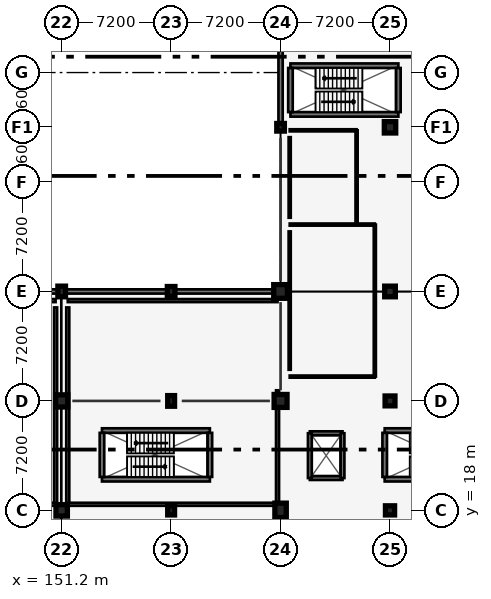
"""IFC4 building model, lengths in metres.
Left out: names, types, materials, properties, quantities, classifications, styles, units other than length and angle.
Written with IfcOpenShell. Run it as: python <this file> out.ifc"""

import sys

from ifc_helpers import new_model, si_unit, direction, frame, frame_2d, origin, origin_2d, place, context, subcontext, project, spatial, rectangle, circle, extrude, element, fill, save


model = new_model("IFC4")
c1 = context("Model", 3, precision=1e-05, world=origin(), true_north=direction((0.0, 1.0)))
c2 = subcontext(c1, "Body", "Model", "MODEL_VIEW")
j1 = project(units=[si_unit("LENGTHUNIT", "METRE"), si_unit("PLANEANGLEUNIT", "RADIAN")], contexts=[c1])
p1 = place(None, origin())
s1 = spatial("IfcSite", under=j1, at=p1, CompositionType="ELEMENT")
p2 = place(p1, origin())
s2 = spatial("IfcBuilding", under=s1, at=p2, CompositionType="ELEMENT")
p3 = place(p2, frame((0.0, 0.0, 9.0)))
s3 = spatial("IfcBuildingStorey", under=s2, at=p3, CompositionType="ELEMENT", Elevation=9.0)
p4 = place(p3, frame((151.2, 18.0, 0.0), z_axis=(0.0, 0.0, 1.0), x_axis=(1.0, 0.0, 0.0)))
e1 = element("IfcColumn", 1, at=p4, inside=s3, PredefinedType="COLUMN", context=c2, shape_type="SweptSolid", body=[
    extrude(rectangle(XDim=0.75, YDim=0.75, at=origin_2d()), origin(), (0.0, 0.0, 1.0), 4.2),
])
p5 = place(p3, frame((151.2, 25.2, 0.0), z_axis=(0.0, 0.0, 1.0), x_axis=(1.0, 0.0, 0.0)))
e2 = element("IfcColumn", 2, at=p5, inside=s3, PredefinedType="COLUMN", context=c2, shape_type="SweptSolid", body=[
    extrude(rectangle(XDim=0.8, YDim=0.8, at=origin_2d()), origin(), (0.0, 0.0, 1.0), 4.2),
])
p6 = place(p3, frame((151.2, 32.4, 0.0), z_axis=(0.0, 0.0, 1.0), x_axis=(1.0, 0.0, 0.0)))
e3 = element("IfcColumn", 3, at=p6, inside=s3, PredefinedType="COLUMN", context=c2, shape_type="SweptSolid", body=[
    extrude(rectangle(XDim=0.5, YDim=0.7, at=origin_2d()), origin(), (0.0, 0.0, 1.0), 4.2),
])
p7 = place(p3, frame((158.4, 18.0, 0.0), z_axis=(0.0, 0.0, 1.0), x_axis=(1.0, 0.0, 0.0)))
e4 = element("IfcColumn", 4, at=p7, inside=s3, PredefinedType="COLUMN", context=c2, shape_type="SweptSolid", body=[
    extrude(rectangle(XDim=0.45, YDim=0.6, at=origin_2d()), origin(), (0.0, 0.0, 1.0), 4.2),
])
p8 = place(p3, frame((158.4, 25.2, 0.0), z_axis=(0.0, 0.0, 1.0), x_axis=(1.0, 0.0, 0.0)))
e5 = element("IfcColumn", 5, at=p8, inside=s3, PredefinedType="COLUMN", context=c2, shape_type="SweptSolid", body=[
    extrude(rectangle(XDim=0.45, YDim=0.7, at=origin_2d()), origin(), (0.0, 0.0, 1.0), 4.2),
])
p9 = place(p3, frame((158.4, 32.4, 0.0), z_axis=(0.0, 0.0, 1.0), x_axis=(1.0, 0.0, 0.0)))
e6 = element("IfcColumn", 6, at=p9, inside=s3, PredefinedType="COLUMN", context=c2, shape_type="SweptSolid", body=[
    extrude(rectangle(XDim=0.5, YDim=0.65, at=origin_2d()), origin(), (0.0, 0.0, 1.0), 4.2),
])
p10 = place(p3, frame((165.6, 18.0, 0.0), z_axis=(0.0, 0.0, 1.0), x_axis=(1.0, 0.0, 0.0)))
e7 = element("IfcColumn", 7, at=p10, inside=s3, PredefinedType="COLUMN", context=c2, shape_type="SweptSolid", body=[
    extrude(rectangle(XDim=0.75, YDim=0.95, at=origin_2d()), origin(), (0.0, 0.0, 1.0), 4.2),
])
p11 = place(p3, frame((165.6, 25.2, 0.0), z_axis=(0.0, 0.0, 1.0), x_axis=(1.0, 0.0, 0.0)))
e8 = element("IfcColumn", 8, at=p11, inside=s3, PredefinedType="COLUMN", context=c2, shape_type="SweptSolid", body=[
    extrude(rectangle(XDim=0.85, YDim=0.85, at=origin_2d()), origin(), (0.0, 0.0, 1.0), 4.2),
])
p12 = place(p3, frame((165.6, 32.4, 0.0), z_axis=(0.0, 0.0, 1.0), x_axis=(1.0, 0.0, 0.0)))
e9 = element("IfcColumn", 9, at=p12, inside=s3, PredefinedType="COLUMN", context=c2, shape_type="SweptSolid", body=[
    extrude(rectangle(XDim=0.9, YDim=0.9, at=origin_2d()), origin(), (0.0, 0.0, 1.0), 4.2),
])
p13 = place(p3, frame((165.6, 43.2, 0.0), z_axis=(0.0, 0.0, 1.0), x_axis=(1.0, 0.0, 0.0)))
e10 = element("IfcColumn", 10, at=p13, inside=s3, PredefinedType="COLUMN", context=c2, shape_type="SweptSolid", body=[
    extrude(circle(Radius=0.25, at=origin_2d()), origin(), (0.0, 0.0, 1.0), 4.2),
])
p14 = place(p3, frame((172.8, 18.0, 0.0), z_axis=(0.0, 0.0, 1.0), x_axis=(1.0, 0.0, 0.0)))
e11 = element("IfcColumn", 11, at=p14, inside=s3, PredefinedType="COLUMN", context=c2, shape_type="SweptSolid", body=[
    extrude(rectangle(XDim=0.6, YDim=0.6, at=origin_2d()), origin(), (0.0, 0.0, 1.0), 4.2),
])
p15 = place(p3, frame((172.8, 25.2, 0.0), z_axis=(0.0, 0.0, 1.0), x_axis=(1.0, 0.0, 0.0)))
e12 = element("IfcColumn", 12, at=p15, inside=s3, PredefinedType="COLUMN", context=c2, shape_type="SweptSolid", body=[
    extrude(rectangle(XDim=0.65, YDim=0.65, at=origin_2d()), origin(), (0.0, 0.0, 1.0), 4.2),
])
p16 = place(p3, frame((172.8, 32.4, 0.0), z_axis=(0.0, 0.0, 1.0), x_axis=(1.0, 0.0, 0.0)))
e13 = element("IfcColumn", 13, at=p16, inside=s3, PredefinedType="COLUMN", context=c2, shape_type="SweptSolid", body=[
    extrude(rectangle(XDim=0.7, YDim=0.7, at=origin_2d()), origin(), (0.0, 0.0, 1.0), 4.2),
])
p17 = place(p3, frame((172.8, 43.2, 0.0), z_axis=(0.0, 0.0, 1.0), x_axis=(1.0, 0.0, 0.0)))
e14 = element("IfcColumn", 14, at=p17, inside=s3, PredefinedType="COLUMN", context=c2, shape_type="SweptSolid", body=[
    extrude(rectangle(XDim=0.75, YDim=0.75, at=origin_2d()), origin(), (0.0, 0.0, 1.0), 4.2),
])
p18 = place(p3, frame((165.6, 86.4, 0.0), z_axis=(0.0, 0.0, 1.0), x_axis=(0.0, -1.0, 0.0)))
e15 = element("IfcWall", 15, at=p18, inside=s3, PredefinedType="SOLIDWALL", context=c2, shape_type="SweptSolid", body=[
    extrude(rectangle(XDim=43.2, YDim=0.28, at=frame_2d((21.6, 0.0))), origin(), (0.0, 0.0, 1.0), 3.4),
])
p19 = place(p18, frame((9.4, 0.0, 0.78)))
e16 = element("IfcOpeningElement", 16, at=p19, cuts=e15, PredefinedType="OPENING", context=c2, shape_type="SweptSolid", body=[
    extrude(rectangle(XDim=2.1, YDim=1.8, at=frame_2d((1.05, 0.9))), frame((0.0, 0.15, 0.0), z_axis=(0.0, -1.0, 0.0), x_axis=(1.0, 0.0, 0.0)), (0.0, 0.0, 1.0), 0.3),
])
p20 = place(p18, frame((16.6, 0.0, 0.78)))
e17 = element("IfcOpeningElement", 17, at=p20, cuts=e15, PredefinedType="OPENING", context=c2, shape_type="SweptSolid", body=[
    extrude(rectangle(XDim=1.1, YDim=1.65, at=frame_2d((0.55, 0.825))), frame((0.0, 0.15, 0.0), z_axis=(0.0, -1.0, 0.0), x_axis=(1.0, 0.0, 0.0)), (0.0, 0.0, 1.0), 0.3),
])
p21 = place(p18, frame((23.8, 0.0, 0.78)))
e18 = element("IfcOpeningElement", 18, at=p21, cuts=e15, PredefinedType="OPENING", context=c2, shape_type="SweptSolid", body=[
    extrude(rectangle(XDim=1.25, YDim=1.7, at=frame_2d((0.625, 0.85))), frame((0.0, 0.15, 0.0), z_axis=(0.0, -1.0, 0.0), x_axis=(1.0, 0.0, 0.0)), (0.0, 0.0, 1.0), 0.3),
])
p22 = place(p3, frame((165.6, 32.4, 0.0), z_axis=(0.0, 0.0, 1.0), x_axis=(-1.0, 0.0, 0.0)))
e19 = element("IfcWall", 19, at=p22, inside=s3, PredefinedType="SOLIDWALL", context=c2, shape_type="SweptSolid", body=[
    extrude(rectangle(XDim=43.2, YDim=0.28, at=frame_2d((21.6, 0.0))), origin(), (0.0, 0.0, 1.0), 3.4),
])
p23 = place(p22, frame((2.2, 0.0, 0.78)))
e20 = element("IfcOpeningElement", 20, at=p23, cuts=e19, PredefinedType="OPENING", context=c2, shape_type="SweptSolid", body=[
    extrude(rectangle(XDim=2.1, YDim=1.8, at=frame_2d((1.05, 0.9))), frame((0.0, 0.15, 0.0), z_axis=(0.0, -1.0, 0.0), x_axis=(1.0, 0.0, 0.0)), (0.0, 0.0, 1.0), 0.3),
])
p24 = place(p22, frame((9.4, 0.0, 0.78)))
e21 = element("IfcOpeningElement", 21, at=p24, cuts=e19, PredefinedType="OPENING", context=c2, shape_type="SweptSolid", body=[
    extrude(rectangle(XDim=1.1, YDim=1.65, at=frame_2d((0.55, 0.825))), frame((0.0, 0.15, 0.0), z_axis=(0.0, -1.0, 0.0), x_axis=(1.0, 0.0, 0.0)), (0.0, 0.0, 1.0), 0.3),
])
p25 = place(p22, frame((16.6, 0.0, 0.78)))
e22 = element("IfcOpeningElement", 22, at=p25, cuts=e19, PredefinedType="OPENING", context=c2, shape_type="SweptSolid", body=[
    extrude(rectangle(XDim=1.25, YDim=1.7, at=frame_2d((0.625, 0.85))), frame((0.0, 0.15, 0.0), z_axis=(0.0, -1.0, 0.0), x_axis=(1.0, 0.0, 0.0)), (0.0, 0.0, 1.0), 0.3),
])
p26 = place(p22, frame((23.8, 0.0, 0.78)))
e23 = element("IfcOpeningElement", 23, at=p26, cuts=e19, PredefinedType="OPENING", context=c2, shape_type="SweptSolid", body=[
    extrude(rectangle(XDim=1.35, YDim=1.75, at=frame_2d((0.675, 0.875))), frame((0.0, 0.15, 0.0), z_axis=(0.0, -1.0, 0.0), x_axis=(1.0, 0.0, 0.0)), (0.0, 0.0, 1.0), 0.3),
])
p27 = place(p22, frame((31.0, 0.0, 0.78)))
e24 = element("IfcOpeningElement", 24, at=p27, cuts=e19, PredefinedType="OPENING", context=c2, shape_type="SweptSolid", body=[
    extrude(rectangle(XDim=1.5, YDim=1.75, at=frame_2d((0.75, 0.875))), frame((0.0, 0.15, 0.0), z_axis=(0.0, -1.0, 0.0), x_axis=(1.0, 0.0, 0.0)), (0.0, 0.0, 1.0), 0.3),
])
p28 = place(p3, frame((153.85, 20.05, 0.0), z_axis=(0.0, 0.0, 1.0), x_axis=(1.0, 0.0, 0.0)))
e25 = element("IfcWall", 25, at=p28, inside=s3, PredefinedType="SHEAR", context=c2, shape_type="SweptSolid", body=[
    extrude(rectangle(XDim=7.1, YDim=0.3, at=frame_2d((3.55, 0.0))), origin(), (0.0, 0.0, 1.0), 3.875),
])
p29 = place(p28, frame((0.35, 0.0, 0.0)))
e26 = element("IfcOpeningElement", 26, at=p29, cuts=e25, PredefinedType="OPENING", context=c2, shape_type="SweptSolid", body=[
    extrude(rectangle(XDim=1.05, YDim=2.15, at=frame_2d((0.525, 1.075))), frame((0.0, 0.16, 0.0), z_axis=(0.0, -1.0, 0.0), x_axis=(1.0, 0.0, 0.0)), (0.0, 0.0, 1.0), 0.32),
])
p30 = place(p3, frame((160.95, 23.25, 0.0), z_axis=(0.0, 0.0, 1.0), x_axis=(-1.0, 0.0, 0.0)))
e27 = element("IfcWall", 27, at=p30, inside=s3, PredefinedType="SHEAR", context=c2, shape_type="SweptSolid", body=[
    extrude(rectangle(XDim=7.1, YDim=0.3, at=frame_2d((3.55, 0.0))), origin(), (0.0, 0.0, 1.0), 3.875),
])
for number, where, z_axis, x_axis in (
    (28, (160.95, 20.2, 0.0), (0.0, 0.0, 1.0), (0.0, 1.0, 0.0)),
    (29, (153.85, 23.1, 0.0), (0.0, 0.0, 1.0), (0.0, -1.0, 0.0)),
):
    element("IfcWall", number, at=place(p3, frame(where, z_axis=z_axis, x_axis=x_axis)), inside=s3, PredefinedType="SHEAR", context=c2, shape_type="SweptSolid", body=[
        extrude(rectangle(XDim=2.9, YDim=0.3, at=frame_2d((1.45, 0.0))), origin(), (0.0, 0.0, 1.0), 3.875),
    ])
p31 = place(p3, frame((172.45, 20.05, 0.0), z_axis=(0.0, 0.0, 1.0), x_axis=(1.0, 0.0, 0.0)))
e30 = element("IfcWall", 30, at=p31, inside=s3, PredefinedType="SHEAR", context=c2, shape_type="SweptSolid", body=[
    extrude(rectangle(XDim=7.1, YDim=0.3, at=frame_2d((3.55, 0.0))), origin(), (0.0, 0.0, 1.0), 3.875),
])
p32 = place(p31, frame((0.35, 0.0, 0.0)))
e31 = element("IfcOpeningElement", 31, at=p32, cuts=e30, PredefinedType="OPENING", context=c2, shape_type="SweptSolid", body=[
    extrude(rectangle(XDim=1.05, YDim=2.15, at=frame_2d((0.525, 1.075))), frame((0.0, 0.16, 0.0), z_axis=(0.0, -1.0, 0.0), x_axis=(1.0, 0.0, 0.0)), (0.0, 0.0, 1.0), 0.32),
])
p33 = place(p3, frame((179.55, 23.25, 0.0), z_axis=(0.0, 0.0, 1.0), x_axis=(-1.0, 0.0, 0.0)))
e32 = element("IfcWall", 32, at=p33, inside=s3, PredefinedType="SHEAR", context=c2, shape_type="SweptSolid", body=[
    extrude(rectangle(XDim=7.1, YDim=0.3, at=frame_2d((3.55, 0.0))), origin(), (0.0, 0.0, 1.0), 3.875),
])
p34 = place(p3, frame((172.45, 23.1, 0.0), z_axis=(0.0, 0.0, 1.0), x_axis=(0.0, -1.0, 0.0)))
e33 = element("IfcWall", 33, at=p34, inside=s3, PredefinedType="SHEAR", context=c2, shape_type="SweptSolid", body=[
    extrude(rectangle(XDim=2.9, YDim=0.3, at=frame_2d((1.45, 0.0))), origin(), (0.0, 0.0, 1.0), 3.875),
])
for number, where, z_axis, x_axis in (
    (34, (166.25, 44.05, 0.0), (0.0, 0.0, 1.0), (1.0, 0.0, 0.0)),
    (35, (173.35, 47.25, 0.0), (0.0, 0.0, 1.0), (-1.0, 0.0, 0.0)),
):
    element("IfcWall", number, at=place(p3, frame(where, z_axis=z_axis, x_axis=x_axis)), inside=s3, PredefinedType="SHEAR", context=c2, shape_type="SweptSolid", body=[
        extrude(rectangle(XDim=7.1, YDim=0.3, at=frame_2d((3.55, 0.0))), origin(), (0.0, 0.0, 1.0), 3.925),
    ])
p35 = place(p3, frame((173.35, 44.2, 0.0), z_axis=(0.0, 0.0, 1.0), x_axis=(0.0, 1.0, 0.0)))
e36 = element("IfcWall", 36, at=p35, inside=s3, PredefinedType="SHEAR", context=c2, shape_type="SweptSolid", body=[
    extrude(rectangle(XDim=2.9, YDim=0.3, at=frame_2d((1.45, 0.0))), origin(), (0.0, 0.0, 1.0), 3.925),
])
p36 = place(p3, frame((166.25, 47.1, 0.0), z_axis=(0.0, 0.0, 1.0), x_axis=(0.0, -1.0, 0.0)))
e37 = element("IfcWall", 37, at=p36, inside=s3, PredefinedType="SHEAR", context=c2, shape_type="SweptSolid", body=[
    extrude(rectangle(XDim=2.9, YDim=0.3, at=frame_2d((1.45, 0.0))), origin(), (0.0, 0.0, 1.0), 3.925),
])
p37 = place(p36, frame((0.75, 0.0, 0.0)))
e38 = element("IfcOpeningElement", 38, at=p37, cuts=e37, PredefinedType="OPENING", context=c2, shape_type="SweptSolid", body=[
    extrude(rectangle(XDim=1.05, YDim=2.15, at=frame_2d((0.525, 1.075))), frame((0.0, 0.16, 0.0), z_axis=(0.0, -1.0, 0.0), x_axis=(1.0, 0.0, 0.0)), (0.0, 0.0, 1.0), 0.32),
])
p38 = place(p3, frame((167.525, 20.125, 0.0), z_axis=(0.0, 0.0, 1.0), x_axis=(1.0, 0.0, 0.0)))
e39 = element("IfcWall", 39, at=p38, inside=s3, PredefinedType="SHEAR", context=c2, shape_type="SweptSolid", body=[
    extrude(rectangle(XDim=2.15, YDim=0.25, at=frame_2d((1.075, 0.0))), origin(), (0.0, 0.0, 1.0), 3.9),
])
p39 = place(p3, frame((169.675, 23.075, 0.0), z_axis=(0.0, 0.0, 1.0), x_axis=(-1.0, 0.0, 0.0)))
e40 = element("IfcWall", 40, at=p39, inside=s3, PredefinedType="SHEAR", context=c2, shape_type="SweptSolid", body=[
    extrude(rectangle(XDim=2.15, YDim=0.25, at=frame_2d((1.075, 0.0))), origin(), (0.0, 0.0, 1.0), 3.9),
])
p40 = place(p39, frame((0.525, 0.0, 0.0)))
e41 = element("IfcOpeningElement", 41, at=p40, cuts=e40, PredefinedType="OPENING", context=c2, shape_type="SweptSolid", body=[
    extrude(rectangle(XDim=1.1, YDim=2.15, at=frame_2d((0.55, 1.075))), frame((0.0, 0.135, 0.0), z_axis=(0.0, -1.0, 0.0), x_axis=(1.0, 0.0, 0.0)), (0.0, 0.0, 1.0), 0.27),
])
for number, where, z_axis, x_axis in (
    (42, (167.525, 23.075, 0.0), (0.0, 0.0, 1.0), (0.0, -1.0, 0.0)),
    (43, (169.675, 20.125, 0.0), (0.0, 0.0, 1.0), (0.0, 1.0, 0.0)),
):
    element("IfcWall", number, at=place(p3, frame(where, z_axis=z_axis, x_axis=x_axis)), inside=s3, PredefinedType="SHEAR", context=c2, shape_type="SweptSolid", body=[
        extrude(rectangle(XDim=2.95, YDim=0.25, at=frame_2d((1.475, 0.0))), origin(), (0.0, 0.0, 1.0), 3.9),
    ])
p41 = place(p3, frame((130.0, 31.8, 0.0), z_axis=(0.0, 0.0, 1.0), x_axis=(1.0, 0.0, 0.0)))
e44 = element("IfcWall", 44, at=p41, inside=s3, PredefinedType="SOLIDWALL", context=c2, shape_type="SweptSolid", body=[
    extrude(rectangle(XDim=20.8, YDim=0.2, at=frame_2d((10.4, 0.0))), origin(), (0.0, 0.0, 1.0), 3.502),
])
p42 = place(p3, frame((150.8, 18.4, 0.0), z_axis=(0.0, 0.0, 1.0), x_axis=(0.0, 1.0, 0.0)))
e45 = element("IfcWall", 45, at=p42, inside=s3, PredefinedType="SOLIDWALL", context=c2, shape_type="SweptSolid", body=[
    extrude(rectangle(XDim=12.95, YDim=0.2, at=frame_2d((6.475, 0.0))), origin(), (0.0, 0.0, 1.0), 3.207),
])
p43 = place(p3, frame((150.8, 18.4, 0.0), z_axis=(0.0, 0.0, 1.0), x_axis=(-1.0, 0.0, 0.0)))
e46 = element("IfcWall", 46, at=p43, inside=s3, PredefinedType="SOLIDWALL", context=c2, shape_type="SweptSolid", body=[
    extrude(rectangle(XDim=20.8, YDim=0.2, at=frame_2d((10.4, 0.0))), origin(), (0.0, 0.0, 1.0), 3.107),
])
p44 = place(p43, frame((9.5, 0.0, 0.0)))
e47 = element("IfcOpeningElement", 47, at=p44, cuts=e46, PredefinedType="OPENING", context=c2, shape_type="SweptSolid", body=[
    extrude(rectangle(XDim=1.8, YDim=2.2, at=frame_2d((0.9, 1.1))), frame((0.0, 0.11, 0.0), z_axis=(0.0, -1.0, 0.0), x_axis=(1.0, 0.0, 0.0)), (0.0, 0.0, 1.0), 0.22),
])
p45 = place(p3, frame((151.6, 31.8, 0.0), z_axis=(0.0, 0.0, 1.0), x_axis=(1.0, 0.0, 0.0)))
e48 = element("IfcWall", 48, at=p45, inside=s3, PredefinedType="SOLIDWALL", context=c2, shape_type="SweptSolid", body=[
    extrude(rectangle(XDim=13.8, YDim=0.2, at=frame_2d((6.9, 0.0))), origin(), (0.0, 0.0, 1.0), 3.007),
])
p46 = place(p3, frame((165.4, 18.4, 0.0), z_axis=(0.0, 0.0, 1.0), x_axis=(0.0, 1.0, 0.0)))
e49 = element("IfcWall", 49, at=p46, inside=s3, PredefinedType="SOLIDWALL", context=c2, shape_type="SweptSolid", body=[
    extrude(rectangle(XDim=7.5, YDim=0.2, at=frame_2d((3.75, 0.0))), origin(), (0.0, 0.0, 1.0), 3.502),
])
p47 = place(p3, frame((151.6, 31.35, 0.0), z_axis=(0.0, 0.0, 1.0), x_axis=(0.0, -1.0, 0.0)))
e50 = element("IfcWall", 50, at=p47, inside=s3, PredefinedType="SOLIDWALL", context=c2, shape_type="SweptSolid", body=[
    extrude(rectangle(XDim=12.95, YDim=0.2, at=frame_2d((6.475, 0.0))), origin(), (0.0, 0.0, 1.0), 3.257),
])
p48 = place(p3, frame((165.4, 18.4, 0.0), z_axis=(0.0, 0.0, 1.0), x_axis=(-1.0, 0.0, 0.0)))
e51 = element("IfcWall", 51, at=p48, inside=s3, PredefinedType="SOLIDWALL", context=c2, shape_type="SweptSolid", body=[
    extrude(rectangle(XDim=13.8, YDim=0.2, at=frame_2d((6.9, 0.0))), origin(), (0.0, 0.0, 1.0), 3.057),
])
p49 = place(p48, frame((3.6, 0.0, 0.0)))
e52 = element("IfcOpeningElement", 52, at=p49, cuts=e51, PredefinedType="OPENING", context=c2, shape_type="SweptSolid", body=[
    extrude(rectangle(XDim=1.8, YDim=2.2, at=frame_2d((0.9, 1.1))), frame((0.0, 0.11, 0.0), z_axis=(0.0, -1.0, 0.0), x_axis=(1.0, 0.0, 0.0)), (0.0, 0.0, 1.0), 0.22),
])
for number, where, z_axis, x_axis in (
    (53, (166.2, 36.8, 0.0), (0.0, 0.0, 1.0), (1.0, 0.0, 0.0)),
    (54, (171.8, 26.8, 0.0), (0.0, 0.0, 1.0), (-1.0, 0.0, 0.0)),
):
    element("IfcWall", number, at=place(p3, frame(where, z_axis=z_axis, x_axis=x_axis)), inside=s3, PredefinedType="PARTITIONING", context=c2, shape_type="SweptSolid", body=[
        extrude(rectangle(XDim=5.6, YDim=0.14, at=frame_2d((2.8, 0.0))), origin(), (0.0, 0.0, 1.0), 3.5),
    ])
p50 = place(p3, frame((166.2, 36.35, 0.0), z_axis=(0.0, 0.0, 1.0), x_axis=(0.0, -1.0, 0.0)))
e55 = element("IfcWall", 55, at=p50, inside=s3, PredefinedType="PARTITIONING", context=c2, shape_type="SweptSolid", body=[
    extrude(rectangle(XDim=9.1, YDim=0.14, at=frame_2d((4.55, 0.0))), origin(), (0.0, 0.0, 1.0), 3.5),
])
p51 = place(p3, frame((171.8, 26.8, 0.0), z_axis=(0.0, 0.0, 1.0), x_axis=(0.0, 1.0, 0.0)))
e56 = element("IfcWall", 56, at=p51, inside=s3, PredefinedType="PARTITIONING", context=c2, shape_type="SweptSolid", body=[
    extrude(rectangle(XDim=10.0, YDim=0.14, at=frame_2d((5.0, 0.0))), origin(), (0.0, 0.0, 1.0), 3.5),
])
p52 = place(p51, frame((2.706, 0.0, 0.0)))
e57 = element("IfcOpeningElement", 57, at=p52, cuts=e56, PredefinedType="OPENING", context=c2, shape_type="SweptSolid", body=[
    extrude(rectangle(XDim=0.98, YDim=2.15, at=frame_2d((0.49, 1.075))), frame((0.0, 0.08, 0.0), z_axis=(0.0, -1.0, 0.0), x_axis=(1.0, 0.0, 0.0)), (0.0, 0.0, 1.0), 0.16),
])
p53 = place(p3, frame((166.2, 43.0, 0.0), z_axis=(0.0, 0.0, 1.0), x_axis=(1.0, 0.0, 0.0)))
e58 = element("IfcWall", 58, at=p53, inside=s3, PredefinedType="PARTITIONING", context=c2, shape_type="SweptSolid", body=[
    extrude(rectangle(XDim=4.4, YDim=0.14, at=frame_2d((2.2, 0.0))), origin(), (0.0, 0.0, 1.0), 3.057),
])
p54 = place(p3, frame((166.2, 42.55, 0.0), z_axis=(0.0, 0.0, 1.0), x_axis=(0.0, -1.0, 0.0)))
e59 = element("IfcWall", 59, at=p54, inside=s3, PredefinedType="PARTITIONING", context=c2, shape_type="SweptSolid", body=[
    extrude(rectangle(XDim=5.3, YDim=0.14, at=frame_2d((2.65, 0.0))), origin(), (0.0, 0.0, 1.0), 3.5),
])
p55 = place(p3, frame((170.6, 37.0, 0.0), z_axis=(0.0, 0.0, 1.0), x_axis=(0.0, 1.0, 0.0)))
e60 = element("IfcWall", 60, at=p55, inside=s3, PredefinedType="PARTITIONING", context=c2, shape_type="SweptSolid", body=[
    extrude(rectangle(XDim=6.0, YDim=0.14, at=frame_2d((3.0, 0.0))), origin(), (0.0, 0.0, 1.0), 3.057),
])
p56 = place(p55, frame((2.505, 0.0, 0.0)))
e61 = element("IfcOpeningElement", 61, at=p56, cuts=e60, PredefinedType="OPENING", context=c2, shape_type="SweptSolid", body=[
    extrude(rectangle(XDim=0.99, YDim=2.15, at=frame_2d((0.495, 1.075))), frame((0.0, 0.08, 0.0), z_axis=(0.0, -1.0, 0.0), x_axis=(1.0, 0.0, 0.0)), (0.0, 0.0, 1.0), 0.16),
])
p57 = place(p23, origin())
e62 = element("IfcWindow", 62, at=p57, inside=s3, PartitioningType="SINGLE_PANEL", PredefinedType="WINDOW", context=c2, shape_type="SweptSolid", body=[
    extrude(rectangle(XDim=2.1, YDim=1.8, at=frame_2d((1.05, 0.9))), frame((0.0, 0.03, 0.0), z_axis=(0.0, -1.0, 0.0), x_axis=(1.0, 0.0, 0.0)), (0.0, 0.0, 1.0), 0.06),
])
fill(e20, e62)
p58 = place(p24, origin())
e63 = element("IfcWindow", 63, at=p58, inside=s3, PartitioningType="SINGLE_PANEL", PredefinedType="WINDOW", context=c2, shape_type="SweptSolid", body=[
    extrude(rectangle(XDim=1.1, YDim=1.65, at=frame_2d((0.55, 0.825))), frame((0.0, 0.03, 0.0), z_axis=(0.0, -1.0, 0.0), x_axis=(1.0, 0.0, 0.0)), (0.0, 0.0, 1.0), 0.06),
])
fill(e21, e63)
p59 = place(p29, origin())
e64 = element("IfcDoor", 64, at=p59, inside=s3, OperationType="SINGLE_SWING_LEFT", PredefinedType="DOOR", context=c2, shape_type="SweptSolid", body=[
    extrude(rectangle(XDim=1.05, YDim=2.15, at=frame_2d((0.525, 1.075))), frame((0.0, 0.025, 0.0), z_axis=(0.0, -1.0, 0.0), x_axis=(1.0, 0.0, 0.0)), (0.0, 0.0, 1.0), 0.05),
])
fill(e26, e64)
p60 = place(p32, origin())
e65 = element("IfcDoor", 65, at=p60, inside=s3, OperationType="SINGLE_SWING_LEFT", PredefinedType="DOOR", context=c2, shape_type="SweptSolid", body=[
    extrude(rectangle(XDim=1.05, YDim=2.15, at=frame_2d((0.525, 1.075))), frame((0.0, 0.025, 0.0), z_axis=(0.0, -1.0, 0.0), x_axis=(1.0, 0.0, 0.0)), (0.0, 0.0, 1.0), 0.05),
])
fill(e31, e65)
p61 = place(p37, origin())
e66 = element("IfcDoor", 66, at=p61, inside=s3, OperationType="SINGLE_SWING_LEFT", PredefinedType="DOOR", context=c2, shape_type="SweptSolid", body=[
    extrude(rectangle(XDim=1.05, YDim=2.15, at=frame_2d((0.525, 1.075))), frame((0.0, 0.025, 0.0), z_axis=(0.0, -1.0, 0.0), x_axis=(1.0, 0.0, 0.0)), (0.0, 0.0, 1.0), 0.05),
])
fill(e38, e66)
p62 = place(p40, origin())
e67 = element("IfcDoor", 67, at=p62, inside=s3, OperationType="SLIDING_TO_LEFT", PredefinedType="DOOR", context=c2, shape_type="SweptSolid", body=[
    extrude(rectangle(XDim=1.1, YDim=2.15, at=frame_2d((0.55, 1.075))), frame((0.0, 0.025, 0.0), z_axis=(0.0, -1.0, 0.0), x_axis=(1.0, 0.0, 0.0)), (0.0, 0.0, 1.0), 0.05),
])
fill(e41, e67)
p63 = place(p49, origin())
e68 = element("IfcDoor", 68, at=p63, inside=s3, OperationType="DOUBLE_SWING_LEFT", PredefinedType="DOOR", context=c2, shape_type="SweptSolid", body=[
    extrude(rectangle(XDim=1.8, YDim=2.2, at=frame_2d((0.9, 1.1))), frame((0.0, 0.025, 0.0), z_axis=(0.0, -1.0, 0.0), x_axis=(1.0, 0.0, 0.0)), (0.0, 0.0, 1.0), 0.05),
])
fill(e52, e68)
p64 = place(p52, origin())
e69 = element("IfcDoor", 69, at=p64, inside=s3, OperationType="SINGLE_SWING_LEFT", PredefinedType="DOOR", context=c2, shape_type="SweptSolid", body=[
    extrude(rectangle(XDim=0.98, YDim=2.15, at=frame_2d((0.49, 1.075))), frame((0.0, 0.025, 0.0), z_axis=(0.0, -1.0, 0.0), x_axis=(1.0, 0.0, 0.0)), (0.0, 0.0, 1.0), 0.05),
])
fill(e57, e69)
p65 = place(p56, origin())
e70 = element("IfcDoor", 70, at=p65, inside=s3, OperationType="SINGLE_SWING_RIGHT", PredefinedType="DOOR", context=c2, shape_type="SweptSolid", body=[
    extrude(rectangle(XDim=0.99, YDim=2.15, at=frame_2d((0.495, 1.075))), frame((0.0, 0.025, 0.0), z_axis=(0.0, -1.0, 0.0), x_axis=(1.0, 0.0, 0.0)), (0.0, 0.0, 1.0), 0.05),
])
fill(e61, e70)
save(model, sys.argv[1])
